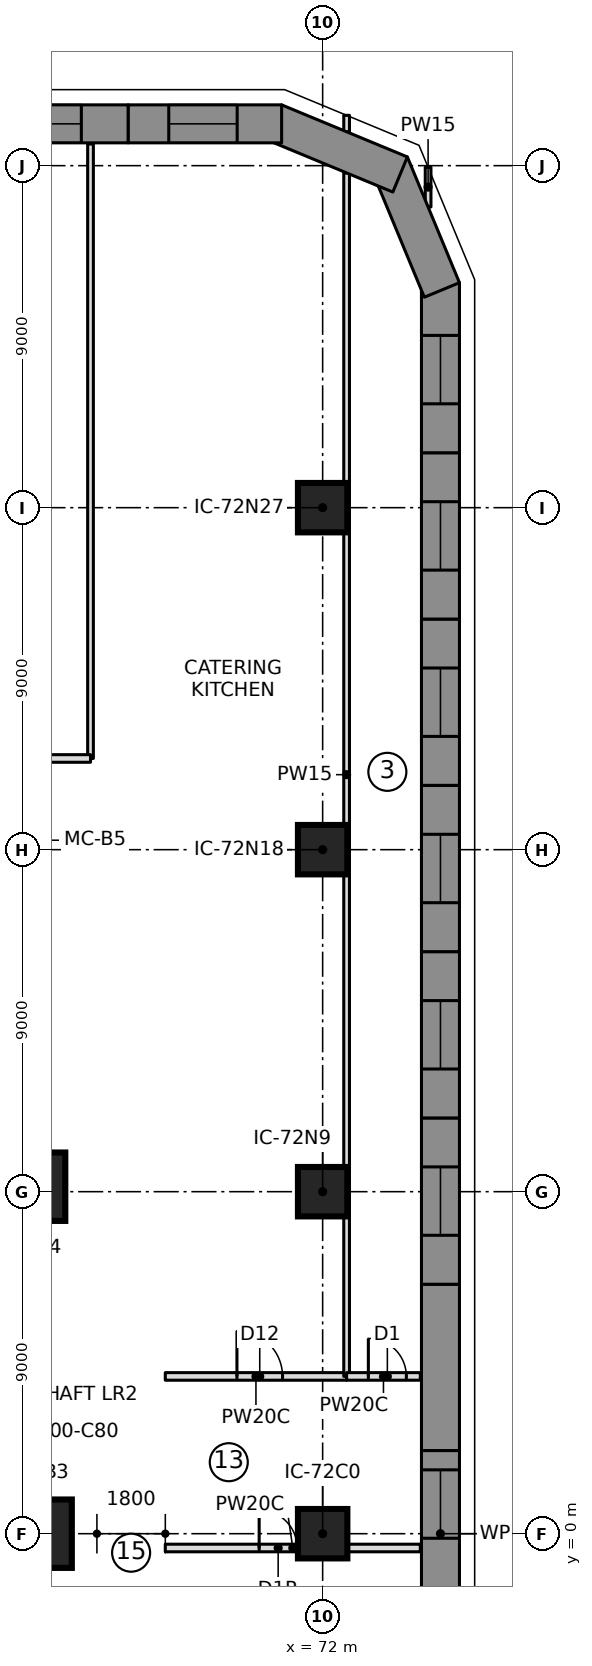
"""IFC4 building model, lengths in metres.
Left out: names, types, materials, properties, quantities, classifications, styles, units other than length and angle.
Written with IfcOpenShell. Run it as: python <this file> out.ifc"""

import sys

from ifc_helpers import new_model, si_unit, direction, frame, frame_2d, origin, origin_2d, place, context, subcontext, project, spatial, polyline, rectangle, outline, extrude, element, fill, save


model = new_model("IFC4")
c1 = context("Model", 3, precision=1e-05, world=origin(), true_north=direction((0.0, 1.0)))
c2 = subcontext(c1, "Body", "Model", "MODEL_VIEW")
j1 = project(units=[si_unit("LENGTHUNIT", "METRE"), si_unit("PLANEANGLEUNIT", "RADIAN")], contexts=[c1])
p1 = place(None, origin())
s1 = spatial("IfcSite", under=j1, at=p1, CompositionType="ELEMENT")
p2 = place(p1, origin())
s2 = spatial("IfcBuilding", under=s1, at=p2, CompositionType="ELEMENT")
p3 = place(p2, frame((0.0, 0.0, 8.0)))
s3 = spatial("IfcBuildingStorey", under=s2, at=p3, CompositionType="ELEMENT", Elevation=8.0)
for number, where, z_axis, x_axis in (
    (1, (64.5, 0.0, 0.0), (0.0, 0.0, 1.0), (1.0, 0.0, 0.0)),
    (2, (64.328, 9.131, 0.0), (0.0, 0.0, 1.0), (1.0, 0.0, 0.0)),
):
    element("IfcColumn", number, at=place(p3, frame(where, z_axis=z_axis, x_axis=x_axis)), inside=s3, PredefinedType="COLUMN", context=c2, shape_type="SweptSolid", body=[
        extrude(rectangle(XDim=1.8, YDim=1.8, at=origin_2d()), origin(), (0.0, 0.0, 1.0), 5.5),
    ])
for number, where, z_axis, x_axis in (
    (3, (72.0, 0.0, 0.0), (0.0, 0.0, 1.0), (1.0, 0.0, 0.0)),
    (4, (72.0, 9.0, 0.0), (0.0, 0.0, 1.0), (1.0, 0.0, 0.0)),
    (5, (72.0, 18.0, 0.0), (0.0, 0.0, 1.0), (1.0, 0.0, 0.0)),
    (6, (72.0, 27.0, 0.0), (0.0, 0.0, 1.0), (1.0, 0.0, 0.0)),
):
    element("IfcColumn", number, at=place(p3, frame(where, z_axis=z_axis, x_axis=x_axis)), inside=s3, PredefinedType="COLUMN", context=c2, shape_type="SweptSolid", body=[
        extrude(rectangle(XDim=1.3, YDim=1.3, at=origin_2d()), origin(), (0.0, 0.0, 1.0), 5.5),
    ])
p4 = place(p3, frame((75.1, -2.188, 0.0), z_axis=(0.0, 0.0, 1.0), x_axis=(0.0, 1.0, 0.0)))
e7 = element("IfcWall", 7, at=p4, inside=s3, PredefinedType="NOTDEFINED", context=c2, shape_type="SweptSolid", body=[
    extrude(outline(polyline([(0.0, -0.5), (4.376, -0.5), (4.376, 0.5), (0.0, 0.5), (0.0, -0.5)])), origin(), (0.0, 0.0, 1.0), 5.2),
])
p5 = place(p4, frame((2.068, 0.0, 0.9)))
e8 = element("IfcOpeningElement", 8, at=p5, cuts=e7, PredefinedType="OPENING", context=c2, shape_type="SweptSolid", body=[
    extrude(rectangle(XDim=1.8, YDim=2.4, at=frame_2d((0.9, 1.2))), frame((0.0, 0.51, 0.0), z_axis=(0.0, -1.0, 0.0), x_axis=(1.0, 0.0, 0.0)), (0.0, 0.0, 1.0), 1.02),
])
p6 = place(p3, frame((75.1, 2.188, 0.0), z_axis=(0.0, 0.0, 1.0), x_axis=(0.0, 1.0, 0.0)))
e9 = element("IfcWall", 9, at=p6, inside=s3, PredefinedType="NOTDEFINED", context=c2, shape_type="SweptSolid", body=[
    extrude(outline(polyline([(0.0, -0.5), (4.376, -0.5), (4.376, 0.5), (0.0, 0.5), (0.0, -0.5)])), origin(), (0.0, 0.0, 1.0), 5.2),
])
p7 = place(p3, frame((75.1, 6.564, 0.0), z_axis=(0.0, 0.0, 1.0), x_axis=(0.0, 1.0, 0.0)))
e10 = element("IfcWall", 10, at=p7, inside=s3, PredefinedType="NOTDEFINED", context=c2, shape_type="SweptSolid", body=[
    extrude(outline(polyline([(0.0, -0.5), (4.376, -0.5), (4.376, 0.5), (0.0, 0.5), (0.0, -0.5)])), origin(), (0.0, 0.0, 1.0), 5.2),
])
p8 = place(p7, frame((1.288, 0.0, 0.9)))
e11 = element("IfcOpeningElement", 11, at=p8, cuts=e10, PredefinedType="OPENING", context=c2, shape_type="SweptSolid", body=[
    extrude(rectangle(XDim=1.8, YDim=2.4, at=frame_2d((0.9, 1.2))), frame((0.0, 0.51, 0.0), z_axis=(0.0, -1.0, 0.0), x_axis=(1.0, 0.0, 0.0)), (0.0, 0.0, 1.0), 1.02),
])
p9 = place(p3, frame((75.1, 10.94, 0.0), z_axis=(0.0, 0.0, 1.0), x_axis=(0.0, 1.0, 0.0)))
e12 = element("IfcWall", 12, at=p9, inside=s3, PredefinedType="NOTDEFINED", context=c2, shape_type="SweptSolid", body=[
    extrude(outline(polyline([(0.0, -0.5), (4.376, -0.5), (4.376, 0.5), (0.0, 0.5), (0.0, -0.5)])), origin(), (0.0, 0.0, 1.0), 5.2),
])
p10 = place(p9, frame((1.288, 0.0, 0.9)))
e13 = element("IfcOpeningElement", 13, at=p10, cuts=e12, PredefinedType="OPENING", context=c2, shape_type="SweptSolid", body=[
    extrude(rectangle(XDim=1.8, YDim=2.4, at=frame_2d((0.9, 1.2))), frame((0.0, 0.51, 0.0), z_axis=(0.0, -1.0, 0.0), x_axis=(1.0, 0.0, 0.0)), (0.0, 0.0, 1.0), 1.02),
])
p11 = place(p3, frame((75.1, 15.316, 0.0), z_axis=(0.0, 0.0, 1.0), x_axis=(0.0, 1.0, 0.0)))
e14 = element("IfcWall", 14, at=p11, inside=s3, PredefinedType="NOTDEFINED", context=c2, shape_type="SweptSolid", body=[
    extrude(outline(polyline([(0.0, -0.5), (4.376, -0.5), (4.376, 0.5), (0.0, 0.5), (0.0, -0.5)])), origin(), (0.0, 0.0, 1.0), 5.2),
])
p12 = place(p11, frame((1.288, 0.0, 0.9)))
e15 = element("IfcOpeningElement", 15, at=p12, cuts=e14, PredefinedType="OPENING", context=c2, shape_type="SweptSolid", body=[
    extrude(rectangle(XDim=1.8, YDim=2.4, at=frame_2d((0.9, 1.2))), frame((0.0, 0.51, 0.0), z_axis=(0.0, -1.0, 0.0), x_axis=(1.0, 0.0, 0.0)), (0.0, 0.0, 1.0), 1.02),
])
p13 = place(p3, frame((75.1, 19.693, 0.0), z_axis=(0.0, 0.0, 1.0), x_axis=(0.0, 1.0, 0.0)))
e16 = element("IfcWall", 16, at=p13, inside=s3, PredefinedType="NOTDEFINED", context=c2, shape_type="SweptSolid", body=[
    extrude(outline(polyline([(0.0, -0.5), (4.376, -0.5), (4.376, 0.5), (0.0, 0.5), (0.0, -0.5)])), origin(), (0.0, 0.0, 1.0), 5.2),
])
p14 = place(p13, frame((1.288, 0.0, 0.9)))
e17 = element("IfcOpeningElement", 17, at=p14, cuts=e16, PredefinedType="OPENING", context=c2, shape_type="SweptSolid", body=[
    extrude(rectangle(XDim=1.8, YDim=2.4, at=frame_2d((0.9, 1.2))), frame((0.0, 0.51, 0.0), z_axis=(0.0, -1.0, 0.0), x_axis=(1.0, 0.0, 0.0)), (0.0, 0.0, 1.0), 1.02),
])
p15 = place(p3, frame((75.1, 24.069, 0.0), z_axis=(0.0, 0.0, 1.0), x_axis=(0.0, 1.0, 0.0)))
e18 = element("IfcWall", 18, at=p15, inside=s3, PredefinedType="NOTDEFINED", context=c2, shape_type="SweptSolid", body=[
    extrude(outline(polyline([(0.0, -0.5), (4.376, -0.5), (4.376, 0.5), (0.0, 0.5), (0.0, -0.5)])), origin(), (0.0, 0.0, 1.0), 5.2),
])
p16 = place(p15, frame((1.288, 0.0, 0.9)))
e19 = element("IfcOpeningElement", 19, at=p16, cuts=e18, PredefinedType="OPENING", context=c2, shape_type="SweptSolid", body=[
    extrude(rectangle(XDim=1.8, YDim=2.4, at=frame_2d((0.9, 1.2))), frame((0.0, 0.51, 0.0), z_axis=(0.0, -1.0, 0.0), x_axis=(1.0, 0.0, 0.0)), (0.0, 0.0, 1.0), 1.02),
])
p17 = place(p3, frame((75.1, 28.445, 0.0), z_axis=(0.0, 0.0, 1.0), x_axis=(0.0, 1.0, 0.0)))
e20 = element("IfcWall", 20, at=p17, inside=s3, PredefinedType="NOTDEFINED", context=c2, shape_type="SweptSolid", body=[
    extrude(outline(polyline([(0.0, -0.5), (4.476, -0.5), (4.277, 0.5), (0.0, 0.5), (0.0, -0.5)])), origin(), (0.0, 0.0, 1.0), 5.2),
])
p18 = place(p17, frame((1.288, 0.0, 0.9)))
e21 = element("IfcOpeningElement", 21, at=p18, cuts=e20, PredefinedType="OPENING", context=c2, shape_type="SweptSolid", body=[
    extrude(rectangle(XDim=1.8, YDim=2.4, at=frame_2d((0.9, 1.2))), frame((0.0, 0.51, 0.0), z_axis=(0.0, -1.0, 0.0), x_axis=(1.0, 0.0, 0.0)), (0.0, 0.0, 1.0), 1.02),
])
p19 = place(p3, frame((75.1, 32.821, 0.0), z_axis=(0.0, 0.0, 1.0), x_axis=(-0.382724875529, 0.923862365102, 0.0)))
e22 = element("IfcWall", 22, at=p19, inside=s3, PredefinedType="NOTDEFINED", context=c2, shape_type="SweptSolid", body=[
    extrude(outline(polyline([(-0.1, -0.5), (3.482, -0.5), (3.068, 0.5), (0.1, 0.5), (-0.1, -0.5)])), origin(), (0.0, 0.0, 1.0), 5.2),
])
p20 = place(p3, frame((73.847, 35.847, 0.0), z_axis=(0.0, 0.0, 1.0), x_axis=(-0.923862365102, 0.382724875529, 0.0)))
e23 = element("IfcWall", 23, at=p20, inside=s3, PredefinedType="NOTDEFINED", context=c2, shape_type="SweptSolid", body=[
    extrude(outline(polyline([(-0.207, -0.5), (3.375, -0.5), (3.175, 0.5), (0.207, 0.5), (-0.207, -0.5)])), origin(), (0.0, 0.0, 1.0), 5.2),
])
p21 = place(p3, frame((70.821, 37.1, 0.0), z_axis=(0.0, 0.0, 1.0), x_axis=(-1.0, 0.0, 0.0)))
e24 = element("IfcWall", 24, at=p21, inside=s3, PredefinedType="NOTDEFINED", context=c2, shape_type="SweptSolid", body=[
    extrude(outline(polyline([(-0.1, -0.5), (3.94, -0.5), (3.94, 0.5), (0.1, 0.5), (-0.1, -0.5)])), origin(), (0.0, 0.0, 1.0), 5.2),
])
p22 = place(p21, frame((1.07, 0.0, 0.9)))
e25 = element("IfcOpeningElement", 25, at=p22, cuts=e24, PredefinedType="OPENING", context=c2, shape_type="SweptSolid", body=[
    extrude(rectangle(XDim=1.8, YDim=2.4, at=frame_2d((0.9, 1.2))), frame((0.0, 0.51, 0.0), z_axis=(0.0, -1.0, 0.0), x_axis=(1.0, 0.0, 0.0)), (0.0, 0.0, 1.0), 1.02),
])
p23 = place(p3, frame((66.881, 37.1, 0.0), z_axis=(0.0, 0.0, 1.0), x_axis=(-1.0, 0.0, 0.0)))
e26 = element("IfcWall", 26, at=p23, inside=s3, PredefinedType="NOTDEFINED", context=c2, shape_type="SweptSolid", body=[
    extrude(outline(polyline([(0.0, -0.5), (3.94, -0.5), (3.94, 0.5), (0.0, 0.5), (0.0, -0.5)])), origin(), (0.0, 0.0, 1.0), 5.2),
])
p24 = place(p23, frame((1.23, 0.0, 0.9)))
e27 = element("IfcOpeningElement", 27, at=p24, cuts=e26, PredefinedType="OPENING", context=c2, shape_type="SweptSolid", body=[
    extrude(rectangle(XDim=1.8, YDim=2.4, at=frame_2d((0.9, 1.2))), frame((0.0, 0.51, 0.0), z_axis=(0.0, -1.0, 0.0), x_axis=(1.0, 0.0, 0.0)), (0.0, 0.0, 1.0), 1.02),
])
p25 = place(p3, frame((67.859, -0.376, 0.0), z_axis=(0.0, 0.0, 1.0), x_axis=(1.0, 0.0, 0.0)))
e28 = element("IfcWall", 28, at=p25, inside=s3, PredefinedType="PARTITIONING", context=c2, shape_type="SweptSolid", body=[
    extrude(rectangle(XDim=6.711, YDim=0.2, at=frame_2d((3.355, 0.0))), origin(), (0.0, 0.0, 1.0), 5.15),
])
p26 = place(p25, frame((2.47, 0.0, 0.0)))
e29 = element("IfcOpeningElement", 29, at=p26, cuts=e28, PredefinedType="OPENING", context=c2, shape_type="SweptSolid", body=[
    extrude(rectangle(XDim=1.0, YDim=2.1, at=frame_2d((0.5, 1.05))), frame((0.0, 0.11, 0.0), z_axis=(0.0, -1.0, 0.0), x_axis=(1.0, 0.0, 0.0)), (0.0, 0.0, 1.0), 0.22),
])
p27 = place(p3, frame((65.892, 20.4, 0.0), z_axis=(0.0, 0.0, 1.0), x_axis=(0.0, 1.0, 0.0)))
e30 = element("IfcWall", 30, at=p27, inside=s3, PredefinedType="PARTITIONING", context=c2, shape_type="SweptSolid", body=[
    extrude(rectangle(XDim=16.17, YDim=0.15, at=frame_2d((8.085, 0.0))), origin(), (0.0, 0.0, 1.0), 5.15),
])
p28 = place(p3, frame((67.859, 4.139, 0.0), z_axis=(0.0, 0.0, 1.0), x_axis=(1.0, 0.0, 0.0)))
e31 = element("IfcWall", 31, at=p28, inside=s3, PredefinedType="PARTITIONING", context=c2, shape_type="SweptSolid", body=[
    extrude(rectangle(XDim=4.772, YDim=0.2, at=frame_2d((2.386, 0.0))), origin(), (0.0, 0.0, 1.0), 5.15),
])
p29 = place(p28, frame((1.886, 0.0, 0.0)))
e32 = element("IfcOpeningElement", 32, at=p29, cuts=e31, PredefinedType="OPENING", context=c2, shape_type="SweptSolid", body=[
    extrude(rectangle(XDim=1.2, YDim=2.1, at=frame_2d((0.6, 1.05))), frame((0.0, 0.11, 0.0), z_axis=(0.0, -1.0, 0.0), x_axis=(1.0, 0.0, 0.0)), (0.0, 0.0, 1.0), 0.22),
])
p30 = place(p3, frame((72.631, 4.139, 0.0), z_axis=(0.0, 0.0, 1.0), x_axis=(0.0, 1.0, 0.0)))
e33 = element("IfcWall", 33, at=p30, inside=s3, PredefinedType="PARTITIONING", context=c2, shape_type="SweptSolid", body=[
    extrude(rectangle(XDim=31.67, YDim=0.15, at=frame_2d((15.835, 0.0))), origin(), (0.0, 0.0, 1.0), 5.15),
])
p31 = place(p3, frame((72.631, 36.892, 0.0), z_axis=(0.0, 0.0, 1.0), x_axis=(0.0, 1.0, 0.0)))
e34 = element("IfcWall", 34, at=p31, inside=s3, PredefinedType="PARTITIONING", context=c2, shape_type="SweptSolid", body=[
    extrude(rectangle(XDim=0.433, YDim=0.15, at=frame_2d((0.217, 0.0))), origin(), (0.0, 0.0, 1.0), 5.15),
])
p32 = place(p3, frame((72.631, 4.139, 0.0), z_axis=(0.0, 0.0, 1.0), x_axis=(1.0, 0.0, 0.0)))
e35 = element("IfcWall", 35, at=p32, inside=s3, PredefinedType="PARTITIONING", context=c2, shape_type="SweptSolid", body=[
    extrude(rectangle(XDim=1.939, YDim=0.2, at=frame_2d((0.97, 0.0))), origin(), (0.0, 0.0, 1.0), 5.15),
])
p33 = place(p32, frame((0.572, 0.0, 0.0)))
e36 = element("IfcOpeningElement", 36, at=p33, cuts=e35, PredefinedType="OPENING", context=c2, shape_type="SweptSolid", body=[
    extrude(rectangle(XDim=1.0, YDim=2.1, at=frame_2d((0.5, 1.05))), frame((0.0, 0.11, 0.0), z_axis=(0.0, -1.0, 0.0), x_axis=(1.0, 0.0, 0.0)), (0.0, 0.0, 1.0), 0.22),
])
p34 = place(p3, frame((74.775, 34.913, 0.0), z_axis=(0.0, 0.0, 1.0), x_axis=(0.0, 1.0, 0.0)))
e37 = element("IfcWall", 37, at=p34, inside=s3, PredefinedType="PARTITIONING", context=c2, shape_type="SweptSolid", body=[
    extrude(rectangle(XDim=1.045, YDim=0.15, at=frame_2d((0.523, 0.0))), origin(), (0.0, 0.0, 1.0), 5.15),
])
p35 = place(p3, frame((65.892, 20.4, 0.0), z_axis=(0.0, 0.0, 1.0), x_axis=(-1.0, 0.0, 0.0)))
e38 = element("IfcWall", 38, at=p35, inside=s3, PredefinedType="PARTITIONING", context=c2, shape_type="SweptSolid", body=[
    extrude(rectangle(XDim=7.351, YDim=0.2, at=frame_2d((3.676, 0.0))), origin(), (0.0, 0.0, 1.0), 5.15),
])
p36 = place(p35, frame((3.176, 0.0, 0.0)))
e39 = element("IfcOpeningElement", 39, at=p36, cuts=e38, PredefinedType="OPENING", context=c2, shape_type="SweptSolid", body=[
    extrude(rectangle(XDim=1.0, YDim=2.1, at=frame_2d((0.5, 1.05))), frame((0.0, 0.11, 0.0), z_axis=(0.0, -1.0, 0.0), x_axis=(1.0, 0.0, 0.0)), (0.0, 0.0, 1.0), 0.22),
])
p37 = place(p5, origin())
e40 = element("IfcWindow", 40, at=p37, inside=s3, PartitioningType="SINGLE_PANEL", PredefinedType="WINDOW", context=c2, shape_type="SweptSolid", body=[
    extrude(rectangle(XDim=1.8, YDim=2.4, at=frame_2d((0.9, 1.2))), frame((0.0, 0.5, 0.0), z_axis=(0.0, -1.0, 0.0), x_axis=(1.0, 0.0, 0.0)), (0.0, 0.0, 1.0), 0.06),
])
fill(e8, e40)
p38 = place(p8, origin())
e41 = element("IfcWindow", 41, at=p38, inside=s3, PartitioningType="SINGLE_PANEL", PredefinedType="WINDOW", context=c2, shape_type="SweptSolid", body=[
    extrude(rectangle(XDim=1.8, YDim=2.4, at=frame_2d((0.9, 1.2))), frame((0.0, 0.5, 0.0), z_axis=(0.0, -1.0, 0.0), x_axis=(1.0, 0.0, 0.0)), (0.0, 0.0, 1.0), 0.06),
])
fill(e11, e41)
p39 = place(p10, origin())
e42 = element("IfcWindow", 42, at=p39, inside=s3, PartitioningType="SINGLE_PANEL", PredefinedType="WINDOW", context=c2, shape_type="SweptSolid", body=[
    extrude(rectangle(XDim=1.8, YDim=2.4, at=frame_2d((0.9, 1.2))), frame((0.0, 0.5, 0.0), z_axis=(0.0, -1.0, 0.0), x_axis=(1.0, 0.0, 0.0)), (0.0, 0.0, 1.0), 0.06),
])
fill(e13, e42)
p40 = place(p12, origin())
e43 = element("IfcWindow", 43, at=p40, inside=s3, PartitioningType="SINGLE_PANEL", PredefinedType="WINDOW", context=c2, shape_type="SweptSolid", body=[
    extrude(rectangle(XDim=1.8, YDim=2.4, at=frame_2d((0.9, 1.2))), frame((0.0, 0.5, 0.0), z_axis=(0.0, -1.0, 0.0), x_axis=(1.0, 0.0, 0.0)), (0.0, 0.0, 1.0), 0.06),
])
fill(e15, e43)
p41 = place(p14, origin())
e44 = element("IfcWindow", 44, at=p41, inside=s3, PartitioningType="SINGLE_PANEL", PredefinedType="WINDOW", context=c2, shape_type="SweptSolid", body=[
    extrude(rectangle(XDim=1.8, YDim=2.4, at=frame_2d((0.9, 1.2))), frame((0.0, 0.5, 0.0), z_axis=(0.0, -1.0, 0.0), x_axis=(1.0, 0.0, 0.0)), (0.0, 0.0, 1.0), 0.06),
])
fill(e17, e44)
p42 = place(p16, origin())
e45 = element("IfcWindow", 45, at=p42, inside=s3, PartitioningType="SINGLE_PANEL", PredefinedType="WINDOW", context=c2, shape_type="SweptSolid", body=[
    extrude(rectangle(XDim=1.8, YDim=2.4, at=frame_2d((0.9, 1.2))), frame((0.0, 0.5, 0.0), z_axis=(0.0, -1.0, 0.0), x_axis=(1.0, 0.0, 0.0)), (0.0, 0.0, 1.0), 0.06),
])
fill(e19, e45)
p43 = place(p18, origin())
e46 = element("IfcWindow", 46, at=p43, inside=s3, PartitioningType="SINGLE_PANEL", PredefinedType="WINDOW", context=c2, shape_type="SweptSolid", body=[
    extrude(rectangle(XDim=1.8, YDim=2.4, at=frame_2d((0.9, 1.2))), frame((0.0, 0.5, 0.0), z_axis=(0.0, -1.0, 0.0), x_axis=(1.0, 0.0, 0.0)), (0.0, 0.0, 1.0), 0.06),
])
fill(e21, e46)
p44 = place(p22, origin())
e47 = element("IfcWindow", 47, at=p44, inside=s3, PartitioningType="SINGLE_PANEL", PredefinedType="WINDOW", context=c2, shape_type="SweptSolid", body=[
    extrude(rectangle(XDim=1.8, YDim=2.4, at=frame_2d((0.9, 1.2))), frame((0.0, 0.5, 0.0), z_axis=(0.0, -1.0, 0.0), x_axis=(1.0, 0.0, 0.0)), (0.0, 0.0, 1.0), 0.06),
])
fill(e25, e47)
p45 = place(p24, origin())
e48 = element("IfcWindow", 48, at=p45, inside=s3, PartitioningType="SINGLE_PANEL", PredefinedType="WINDOW", context=c2, shape_type="SweptSolid", body=[
    extrude(rectangle(XDim=1.8, YDim=2.4, at=frame_2d((0.9, 1.2))), frame((0.0, 0.5, 0.0), z_axis=(0.0, -1.0, 0.0), x_axis=(1.0, 0.0, 0.0)), (0.0, 0.0, 1.0), 0.06),
])
fill(e27, e48)
p46 = place(p26, origin())
e49 = element("IfcDoor", 49, at=p46, inside=s3, OperationType="SINGLE_SWING_RIGHT", PredefinedType="DOOR", context=c2, shape_type="SweptSolid", body=[
    extrude(rectangle(XDim=1.0, YDim=2.1, at=frame_2d((0.5, 1.05))), frame((0.0, 0.025, 0.0), z_axis=(0.0, -1.0, 0.0), x_axis=(1.0, 0.0, 0.0)), (0.0, 0.0, 1.0), 0.05),
])
fill(e29, e49)
p47 = place(p29, origin())
e50 = element("IfcDoor", 50, at=p47, inside=s3, OperationType="SINGLE_SWING_RIGHT", PredefinedType="DOOR", context=c2, shape_type="SweptSolid", body=[
    extrude(rectangle(XDim=1.2, YDim=2.1, at=frame_2d((0.6, 1.05))), frame((0.0, 0.025, 0.0), z_axis=(0.0, -1.0, 0.0), x_axis=(1.0, 0.0, 0.0)), (0.0, 0.0, 1.0), 0.05),
])
fill(e32, e50)
p48 = place(p33, origin())
e51 = element("IfcDoor", 51, at=p48, inside=s3, OperationType="SINGLE_SWING_LEFT", PredefinedType="DOOR", context=c2, shape_type="SweptSolid", body=[
    extrude(rectangle(XDim=1.0, YDim=2.1, at=frame_2d((0.5, 1.05))), frame((0.0, 0.025, 0.0), z_axis=(0.0, -1.0, 0.0), x_axis=(1.0, 0.0, 0.0)), (0.0, 0.0, 1.0), 0.05),
])
fill(e36, e51)
save(model, sys.argv[1])
